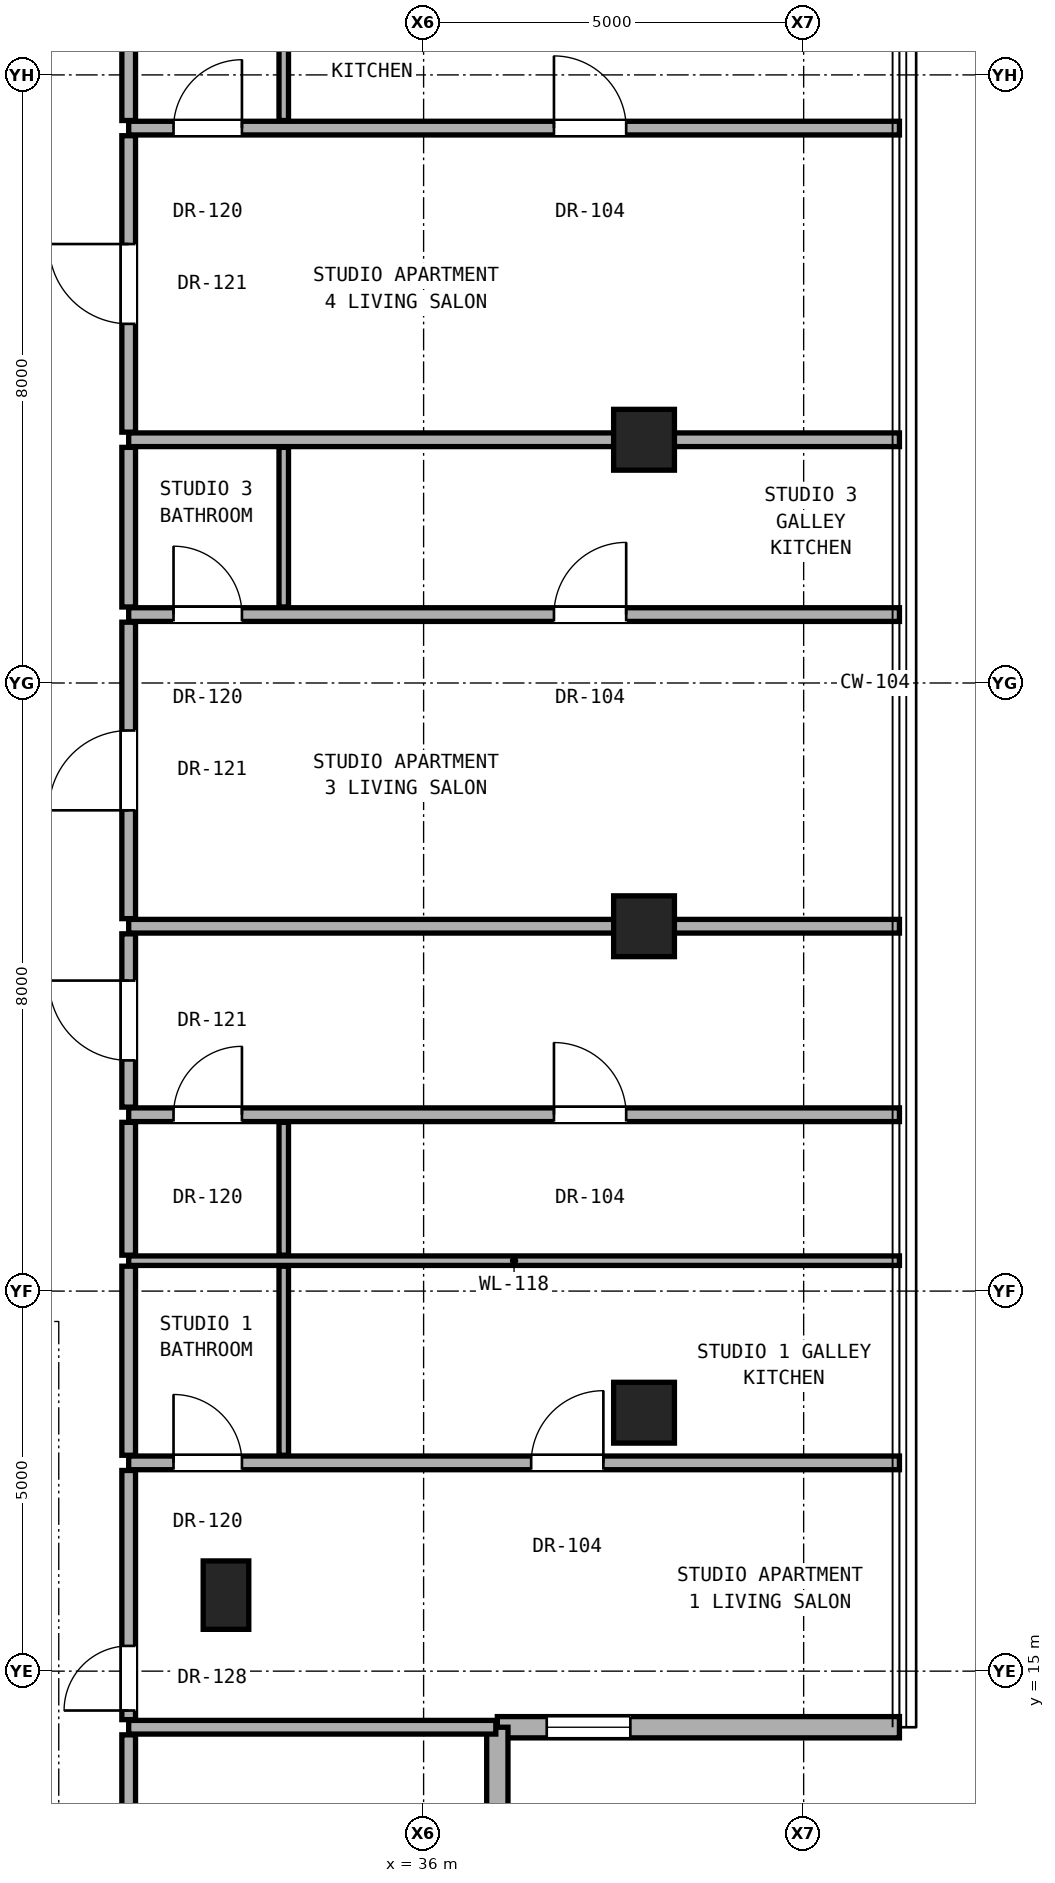
"""IFC4 building model, lengths in metres.
Left out: names, types, materials, properties, quantities, classifications, styles, units other than length and angle.
Written with IfcOpenShell. Run it as: python <this file> out.ifc"""

import sys

from ifc_helpers import new_model, si_unit, direction, frame, frame_2d, origin, origin_2d, place, context, subcontext, project, spatial, rectangle, hollow_rectangle, extrude, element, fill, save


model = new_model("IFC4")
c1 = context("Model", 3, precision=1e-05, world=origin(), true_north=direction((0.0, 1.0)))
c2 = subcontext(c1, "Body", "Model", "MODEL_VIEW")
j1 = project(units=[si_unit("LENGTHUNIT", "METRE"), si_unit("PLANEANGLEUNIT", "RADIAN")], contexts=[c1])
p1 = place(None, origin())
s1 = spatial("IfcSite", under=j1, at=p1, CompositionType="ELEMENT")
p2 = place(p1, origin())
s2 = spatial("IfcBuilding", under=s1, at=p2, CompositionType="ELEMENT")
p3 = place(p2, frame((0.0, 0.0, 239.2)))
s3 = spatial("IfcBuildingStorey", under=s2, at=p3, CompositionType="ELEMENT", Elevation=239.2)
for number, where, z_axis, x_axis in (
    (1, (38.9, 18.4, 0.0), (0.0, 0.0, 1.0), (1.0, 0.0, 0.0)),
    (2, (38.9, 24.8, 0.0), (0.0, 0.0, 1.0), (1.0, 0.0, 0.0)),
    (3, (38.9, 31.2, 0.0), (0.0, 0.0, 1.0), (1.0, 0.0, 0.0)),
):
    element("IfcColumn", number, at=place(p3, frame(where, z_axis=z_axis, x_axis=x_axis)), inside=s3, PredefinedType="COLUMN", context=c2, shape_type="SweptSolid", body=[
        extrude(hollow_rectangle(XDim=0.8, YDim=0.8, WallThickness=0.045, at=origin_2d()), origin(), (0.0, 0.0, 1.0), 3.3),
    ])
p4 = place(p3, frame((33.4, 16.0, 0.0), z_axis=(0.0, 0.0, 1.0), x_axis=(1.0, 0.0, 0.0)))
e4 = element("IfcColumn", 4, at=p4, inside=s3, PredefinedType="PILASTER", context=c2, shape_type="SweptSolid", body=[
    extrude(rectangle(XDim=0.6, YDim=0.9, at=origin_2d()), origin(), (0.0, 0.0, 1.0), 3.3),
])
p5 = place(p3, frame((36.97, 14.262, 0.0), z_axis=(0.0, 0.0, 1.0), x_axis=(1.0, 0.0, 0.0)))
e5 = element("IfcWall", 5, at=p5, inside=s3, PredefinedType="SOLIDWALL", context=c2, shape_type="SweptSolid", body=[
    extrude(rectangle(XDim=5.29, YDim=0.28, at=frame_2d((2.645, 0.0))), origin(), (0.0, 0.0, 1.0), 3.08),
])
p6 = place(p5, frame((0.65, 0.0, 0.85)))
e6 = element("IfcOpeningElement", 6, at=p6, cuts=e5, PredefinedType="OPENING", context=c2, shape_type="SweptSolid", body=[
    extrude(rectangle(XDim=1.1, YDim=2.0, at=frame_2d((0.55, 1.0))), frame((0.0, 0.15, 0.0), z_axis=(0.0, -1.0, 0.0), x_axis=(1.0, 0.0, 0.0)), (0.0, 0.0, 1.0), 0.3),
])
p7 = place(p3, frame((36.97, 8.972, 0.0), z_axis=(0.0, 0.0, 1.0), x_axis=(0.0, 1.0, 0.0)))
e7 = element("IfcWall", 7, at=p7, inside=s3, PredefinedType="SOLIDWALL", context=c2, shape_type="SweptSolid", body=[
    extrude(rectangle(XDim=5.29, YDim=0.28, at=frame_2d((2.645, 0.0))), origin(), (0.0, 0.0, 1.0), 3.08),
])
p8 = place(p3, frame((32.12, 14.262, 0.0), z_axis=(0.0, 0.0, 1.0), x_axis=(1.0, 0.0, 0.0)))
e8 = element("IfcWall", 8, at=p8, inside=s3, PredefinedType="PARTITIONING", context=c2, shape_type="SweptSolid", body=[
    extrude(rectangle(XDim=4.83, YDim=0.18, at=frame_2d((2.415, 0.0))), origin(), (0.0, 0.0, 1.0), 3.1),
])
p9 = place(p3, frame((32.12, 17.74, 0.0), z_axis=(0.0, 0.0, 1.0), x_axis=(1.0, 0.0, 0.0)))
e9 = element("IfcWall", 9, at=p9, inside=s3, PredefinedType="PARTITIONING", context=c2, shape_type="SweptSolid", body=[
    extrude(rectangle(XDim=10.14, YDim=0.18, at=frame_2d((5.07, 0.0))), origin(), (0.0, 0.0, 1.0), 2.543),
])
p10 = place(p9, frame((5.295, 0.0, 0.0)))
e10 = element("IfcOpeningElement", 10, at=p10, cuts=e9, PredefinedType="OPENING", context=c2, shape_type="SweptSolid", body=[
    extrude(rectangle(XDim=0.95, YDim=2.15, at=frame_2d((0.475, 1.075))), frame((0.0, 0.1, 0.0), z_axis=(0.0, -1.0, 0.0), x_axis=(1.0, 0.0, 0.0)), (0.0, 0.0, 1.0), 0.2),
])
p11 = place(p9, frame((0.59, 0.0, 0.0)))
e11 = element("IfcOpeningElement", 11, at=p11, cuts=e9, PredefinedType="OPENING", context=c2, shape_type="SweptSolid", body=[
    extrude(rectangle(XDim=0.9, YDim=2.1, at=frame_2d((0.45, 1.05))), frame((0.0, 0.1, 0.0), z_axis=(0.0, -1.0, 0.0), x_axis=(1.0, 0.0, 0.0)), (0.0, 0.0, 1.0), 0.2),
])
p12 = place(p3, frame((32.12, 20.4, 0.0), z_axis=(0.0, 0.0, 1.0), x_axis=(1.0, 0.0, 0.0)))
e12 = element("IfcWall", 12, at=p12, inside=s3, PredefinedType="PARTITIONING", context=c2, shape_type="SweptSolid", body=[
    extrude(rectangle(XDim=10.14, YDim=0.125, at=frame_2d((5.07, 0.0))), origin(), (0.0, 0.0, 1.0), 2.319),
])
p13 = place(p3, frame((32.12, 22.32, 0.0), z_axis=(0.0, 0.0, 1.0), x_axis=(1.0, 0.0, 0.0)))
e13 = element("IfcWall", 13, at=p13, inside=s3, PredefinedType="PARTITIONING", context=c2, shape_type="SweptSolid", body=[
    extrude(rectangle(XDim=10.14, YDim=0.18, at=frame_2d((5.07, 0.0))), origin(), (0.0, 0.0, 1.0), 2.319),
])
p14 = place(p13, frame((5.595, 0.0, 0.0)))
e14 = element("IfcOpeningElement", 14, at=p14, cuts=e13, PredefinedType="OPENING", context=c2, shape_type="SweptSolid", body=[
    extrude(rectangle(XDim=0.95, YDim=2.15, at=frame_2d((0.475, 1.075))), frame((0.0, 0.1, 0.0), z_axis=(0.0, -1.0, 0.0), x_axis=(1.0, 0.0, 0.0)), (0.0, 0.0, 1.0), 0.2),
])
p15 = place(p13, frame((0.59, 0.0, 0.0)))
e15 = element("IfcOpeningElement", 15, at=p15, cuts=e13, PredefinedType="OPENING", context=c2, shape_type="SweptSolid", body=[
    extrude(rectangle(XDim=0.9, YDim=2.1, at=frame_2d((0.45, 1.05))), frame((0.0, 0.1, 0.0), z_axis=(0.0, -1.0, 0.0), x_axis=(1.0, 0.0, 0.0)), (0.0, 0.0, 1.0), 0.2),
])
p16 = place(p3, frame((32.12, 24.8, 0.0), z_axis=(0.0, 0.0, 1.0), x_axis=(1.0, 0.0, 0.0)))
e16 = element("IfcWall", 16, at=p16, inside=s3, PredefinedType="PARTITIONING", context=c2, shape_type="SweptSolid", body=[
    extrude(rectangle(XDim=10.14, YDim=0.18, at=frame_2d((5.07, 0.0))), origin(), (0.0, 0.0, 1.0), 2.319),
])
p17 = place(p3, frame((32.12, 28.9, 0.0), z_axis=(0.0, 0.0, 1.0), x_axis=(1.0, 0.0, 0.0)))
e17 = element("IfcWall", 17, at=p17, inside=s3, PredefinedType="PARTITIONING", context=c2, shape_type="SweptSolid", body=[
    extrude(rectangle(XDim=10.14, YDim=0.18, at=frame_2d((5.07, 0.0))), origin(), (0.0, 0.0, 1.0), 2.319),
])
p18 = place(p17, frame((5.595, 0.0, 0.0)))
e18 = element("IfcOpeningElement", 18, at=p18, cuts=e17, PredefinedType="OPENING", context=c2, shape_type="SweptSolid", body=[
    extrude(rectangle(XDim=0.95, YDim=2.15, at=frame_2d((0.475, 1.075))), frame((0.0, 0.1, 0.0), z_axis=(0.0, -1.0, 0.0), x_axis=(1.0, 0.0, 0.0)), (0.0, 0.0, 1.0), 0.2),
])
p19 = place(p17, frame((0.59, 0.0, 0.0)))
e19 = element("IfcOpeningElement", 19, at=p19, cuts=e17, PredefinedType="OPENING", context=c2, shape_type="SweptSolid", body=[
    extrude(rectangle(XDim=0.9, YDim=2.1, at=frame_2d((0.45, 1.05))), frame((0.0, 0.1, 0.0), z_axis=(0.0, -1.0, 0.0), x_axis=(1.0, 0.0, 0.0)), (0.0, 0.0, 1.0), 0.2),
])
p20 = place(p3, frame((32.12, 31.2, 0.0), z_axis=(0.0, 0.0, 1.0), x_axis=(1.0, 0.0, 0.0)))
e20 = element("IfcWall", 20, at=p20, inside=s3, PredefinedType="PARTITIONING", context=c2, shape_type="SweptSolid", body=[
    extrude(rectangle(XDim=10.14, YDim=0.18, at=frame_2d((5.07, 0.0))), origin(), (0.0, 0.0, 1.0), 2.319),
])
p21 = place(p3, frame((32.12, 35.3, 0.0), z_axis=(0.0, 0.0, 1.0), x_axis=(1.0, 0.0, 0.0)))
e21 = element("IfcWall", 21, at=p21, inside=s3, PredefinedType="PARTITIONING", context=c2, shape_type="SweptSolid", body=[
    extrude(rectangle(XDim=10.14, YDim=0.18, at=frame_2d((5.07, 0.0))), origin(), (0.0, 0.0, 1.0), 2.319),
])
p22 = place(p21, frame((5.595, 0.0, 0.0)))
e22 = element("IfcOpeningElement", 22, at=p22, cuts=e21, PredefinedType="OPENING", context=c2, shape_type="SweptSolid", body=[
    extrude(rectangle(XDim=0.95, YDim=2.15, at=frame_2d((0.475, 1.075))), frame((0.0, 0.1, 0.0), z_axis=(0.0, -1.0, 0.0), x_axis=(1.0, 0.0, 0.0)), (0.0, 0.0, 1.0), 0.2),
])
p23 = place(p21, frame((0.59, 0.0, 0.0)))
e23 = element("IfcOpeningElement", 23, at=p23, cuts=e21, PredefinedType="OPENING", context=c2, shape_type="SweptSolid", body=[
    extrude(rectangle(XDim=0.9, YDim=2.1, at=frame_2d((0.45, 1.05))), frame((0.0, 0.1, 0.0), z_axis=(0.0, -1.0, 0.0), x_axis=(1.0, 0.0, 0.0)), (0.0, 0.0, 1.0), 0.2),
])
p24 = place(p3, frame((32.12, 8.972, 0.0), z_axis=(0.0, 0.0, 1.0), x_axis=(0.0, 1.0, 0.0)))
e24 = element("IfcWall", 24, at=p24, inside=s3, PredefinedType="PARTITIONING", context=c2, shape_type="SweptSolid", body=[
    extrude(rectangle(XDim=5.19, YDim=0.18, at=frame_2d((2.595, 0.0))), origin(), (0.0, 0.0, 1.0), 3.1),
])
p25 = place(p24, frame((2.12, 0.0, 0.0)))
e25 = element("IfcOpeningElement", 25, at=p25, cuts=e24, PredefinedType="OPENING", context=c2, shape_type="SweptSolid", body=[
    extrude(rectangle(XDim=0.95, YDim=2.15, at=frame_2d((0.475, 1.075))), frame((0.0, 0.1, 0.0), z_axis=(0.0, -1.0, 0.0), x_axis=(1.0, 0.0, 0.0)), (0.0, 0.0, 1.0), 0.2),
])
p26 = place(p3, frame((32.12, 14.362, 0.0), z_axis=(0.0, 0.0, 1.0), x_axis=(0.0, 1.0, 0.0)))
e26 = element("IfcWall", 26, at=p26, inside=s3, PredefinedType="PARTITIONING", context=c2, shape_type="SweptSolid", body=[
    extrude(rectangle(XDim=3.278, YDim=0.18, at=frame_2d((1.639, 0.0))), origin(), (0.0, 0.0, 1.0), 2.543),
])
p27 = place(p26, frame((0.12, 0.0, 0.0)))
e27 = element("IfcOpeningElement", 27, at=p27, cuts=e26, PredefinedType="OPENING", context=c2, shape_type="SweptSolid", body=[
    extrude(rectangle(XDim=0.85, YDim=2.01, at=frame_2d((0.425, 1.005))), frame((0.0, 0.1, 0.0), z_axis=(0.0, -1.0, 0.0), x_axis=(1.0, 0.0, 0.0)), (0.0, 0.0, 1.0), 0.2),
])
p28 = place(p3, frame((32.12, 17.84, 0.0), z_axis=(0.0, 0.0, 1.0), x_axis=(0.0, 1.0, 0.0)))
e28 = element("IfcWall", 28, at=p28, inside=s3, PredefinedType="PARTITIONING", context=c2, shape_type="SweptSolid", body=[
    extrude(rectangle(XDim=2.487, YDim=0.18, at=frame_2d((1.244, 0.0))), origin(), (0.0, 0.0, 1.0), 2.492),
])
p29 = place(p3, frame((32.12, 20.472, 0.0), z_axis=(0.0, 0.0, 1.0), x_axis=(0.0, 1.0, 0.0)))
e29 = element("IfcWall", 29, at=p29, inside=s3, PredefinedType="PARTITIONING", context=c2, shape_type="SweptSolid", body=[
    extrude(rectangle(XDim=1.748, YDim=0.18, at=frame_2d((0.874, 0.0))), origin(), (0.0, 0.0, 1.0), 3.1),
])
p30 = place(p3, frame((32.12, 22.42, 0.0), z_axis=(0.0, 0.0, 1.0), x_axis=(0.0, 1.0, 0.0)))
e30 = element("IfcWall", 30, at=p30, inside=s3, PredefinedType="PARTITIONING", context=c2, shape_type="SweptSolid", body=[
    extrude(rectangle(XDim=2.28, YDim=0.18, at=frame_2d((1.14, 0.0))), origin(), (0.0, 0.0, 1.0), 2.396),
])
p31 = place(p30, frame((0.615, 0.0, 0.0)))
e31 = element("IfcOpeningElement", 31, at=p31, cuts=e30, PredefinedType="OPENING", context=c2, shape_type="SweptSolid", body=[
    extrude(rectangle(XDim=1.05, YDim=2.2, at=frame_2d((0.525, 1.1))), frame((0.0, 0.1, 0.0), z_axis=(0.0, -1.0, 0.0), x_axis=(1.0, 0.0, 0.0)), (0.0, 0.0, 1.0), 0.2),
])
p32 = place(p3, frame((32.12, 24.9, 0.0), z_axis=(0.0, 0.0, 1.0), x_axis=(0.0, 1.0, 0.0)))
e32 = element("IfcWall", 32, at=p32, inside=s3, PredefinedType="PARTITIONING", context=c2, shape_type="SweptSolid", body=[
    extrude(rectangle(XDim=3.9, YDim=0.18, at=frame_2d((1.95, 0.0))), origin(), (0.0, 0.0, 1.0), 2.396),
])
p33 = place(p32, frame((1.425, 0.0, 0.0)))
e33 = element("IfcOpeningElement", 33, at=p33, cuts=e32, PredefinedType="OPENING", context=c2, shape_type="SweptSolid", body=[
    extrude(rectangle(XDim=1.05, YDim=2.2, at=frame_2d((0.525, 1.1))), frame((0.0, 0.1, 0.0), z_axis=(0.0, -1.0, 0.0), x_axis=(1.0, 0.0, 0.0)), (0.0, 0.0, 1.0), 0.2),
])
p34 = place(p3, frame((32.12, 29.0, 0.0), z_axis=(0.0, 0.0, 1.0), x_axis=(0.0, 1.0, 0.0)))
e34 = element("IfcWall", 34, at=p34, inside=s3, PredefinedType="PARTITIONING", context=c2, shape_type="SweptSolid", body=[
    extrude(rectangle(XDim=2.1, YDim=0.18, at=frame_2d((1.05, 0.0))), origin(), (0.0, 0.0, 1.0), 2.396),
])
p35 = place(p3, frame((32.12, 31.3, 0.0), z_axis=(0.0, 0.0, 1.0), x_axis=(0.0, 1.0, 0.0)))
e35 = element("IfcWall", 35, at=p35, inside=s3, PredefinedType="PARTITIONING", context=c2, shape_type="SweptSolid", body=[
    extrude(rectangle(XDim=3.9, YDim=0.18, at=frame_2d((1.95, 0.0))), origin(), (0.0, 0.0, 1.0), 2.396),
])
p36 = place(p35, frame((1.425, 0.0, 0.0)))
e36 = element("IfcOpeningElement", 36, at=p36, cuts=e35, PredefinedType="OPENING", context=c2, shape_type="SweptSolid", body=[
    extrude(rectangle(XDim=1.05, YDim=2.2, at=frame_2d((0.525, 1.1))), frame((0.0, 0.1, 0.0), z_axis=(0.0, -1.0, 0.0), x_axis=(1.0, 0.0, 0.0)), (0.0, 0.0, 1.0), 0.2),
])
p37 = place(p3, frame((32.12, 35.4, 0.0), z_axis=(0.0, 0.0, 1.0), x_axis=(0.0, 1.0, 0.0)))
e37 = element("IfcWall", 37, at=p37, inside=s3, PredefinedType="PARTITIONING", context=c2, shape_type="SweptSolid", body=[
    extrude(rectangle(XDim=2.1, YDim=0.18, at=frame_2d((1.05, 0.0))), origin(), (0.0, 0.0, 1.0), 2.492),
])
p38 = place(p3, frame((34.16, 17.84, 0.0), z_axis=(0.0, 0.0, 1.0), x_axis=(0.0, 1.0, 0.0)))
e38 = element("IfcWall", 38, at=p38, inside=s3, PredefinedType="PARTITIONING", context=c2, shape_type="SweptSolid", body=[
    extrude(rectangle(XDim=2.487, YDim=0.125, at=frame_2d((1.244, 0.0))), origin(), (0.0, 0.0, 1.0), 2.492),
])
p39 = place(p3, frame((34.16, 20.472, 0.0), z_axis=(0.0, 0.0, 1.0), x_axis=(0.0, 1.0, 0.0)))
e39 = element("IfcWall", 39, at=p39, inside=s3, PredefinedType="PARTITIONING", context=c2, shape_type="SweptSolid", body=[
    extrude(rectangle(XDim=1.748, YDim=0.125, at=frame_2d((0.874, 0.0))), origin(), (0.0, 0.0, 1.0), 3.1),
])
p40 = place(p3, frame((34.16, 29.0, 0.0), z_axis=(0.0, 0.0, 1.0), x_axis=(0.0, 1.0, 0.0)))
e40 = element("IfcWall", 40, at=p40, inside=s3, PredefinedType="PARTITIONING", context=c2, shape_type="SweptSolid", body=[
    extrude(rectangle(XDim=2.1, YDim=0.125, at=frame_2d((1.05, 0.0))), origin(), (0.0, 0.0, 1.0), 2.396),
])
p41 = place(p3, frame((34.16, 35.4, 0.0), z_axis=(0.0, 0.0, 1.0), x_axis=(0.0, 1.0, 0.0)))
e41 = element("IfcWall", 41, at=p41, inside=s3, PredefinedType="PARTITIONING", context=c2, shape_type="SweptSolid", body=[
    extrude(rectangle(XDim=2.1, YDim=0.125, at=frame_2d((1.05, 0.0))), origin(), (0.0, 0.0, 1.0), 2.492),
])
p42 = place(p6, origin())
e42 = element("IfcWindow", 42, at=p42, inside=s3, PartitioningType="SINGLE_PANEL", PredefinedType="WINDOW", context=c2, shape_type="SweptSolid", body=[
    extrude(rectangle(XDim=1.1, YDim=2.0, at=frame_2d((0.55, 1.0))), frame((0.0, 0.03, 0.0), z_axis=(0.0, -1.0, 0.0), x_axis=(1.0, 0.0, 0.0)), (0.0, 0.0, 1.0), 0.06),
])
fill(e6, e42)
p43 = place(p27, origin())
e43 = element("IfcDoor", 43, at=p43, inside=s3, OperationType="SINGLE_SWING_LEFT", PredefinedType="DOOR", context=c2, shape_type="SweptSolid", body=[
    extrude(rectangle(XDim=0.85, YDim=2.01, at=frame_2d((0.425, 1.005))), frame((0.0, 0.025, 0.0), z_axis=(0.0, -1.0, 0.0), x_axis=(1.0, 0.0, 0.0)), (0.0, 0.0, 1.0), 0.05),
])
fill(e27, e43)
p44 = place(p10, origin())
e44 = element("IfcDoor", 44, at=p44, inside=s3, OperationType="SINGLE_SWING_RIGHT", PredefinedType="DOOR", context=c2, shape_type="SweptSolid", body=[
    extrude(rectangle(XDim=0.95, YDim=2.15, at=frame_2d((0.475, 1.075))), frame((0.0, 0.025, 0.0), z_axis=(0.0, -1.0, 0.0), x_axis=(1.0, 0.0, 0.0)), (0.0, 0.0, 1.0), 0.05),
])
fill(e10, e44)
p45 = place(p11, origin())
e45 = element("IfcDoor", 45, at=p45, inside=s3, OperationType="SINGLE_SWING_LEFT", PredefinedType="DOOR", context=c2, shape_type="SweptSolid", body=[
    extrude(rectangle(XDim=0.9, YDim=2.1, at=frame_2d((0.45, 1.05))), frame((0.0, 0.025, 0.0), z_axis=(0.0, -1.0, 0.0), x_axis=(1.0, 0.0, 0.0)), (0.0, 0.0, 1.0), 0.05),
])
fill(e11, e45)
p46 = place(p31, origin())
e46 = element("IfcDoor", 46, at=p46, inside=s3, OperationType="SINGLE_SWING_RIGHT", PredefinedType="DOOR", context=c2, shape_type="SweptSolid", body=[
    extrude(rectangle(XDim=1.05, YDim=2.2, at=frame_2d((0.525, 1.1))), frame((0.0, 0.025, 0.0), z_axis=(0.0, -1.0, 0.0), x_axis=(1.0, 0.0, 0.0)), (0.0, 0.0, 1.0), 0.05),
])
fill(e31, e46)
p47 = place(p14, origin())
e47 = element("IfcDoor", 47, at=p47, inside=s3, OperationType="SINGLE_SWING_LEFT", PredefinedType="DOOR", context=c2, shape_type="SweptSolid", body=[
    extrude(rectangle(XDim=0.95, YDim=2.15, at=frame_2d((0.475, 1.075))), frame((0.0, 0.025, 0.0), z_axis=(0.0, -1.0, 0.0), x_axis=(1.0, 0.0, 0.0)), (0.0, 0.0, 1.0), 0.05),
])
fill(e14, e47)
p48 = place(p15, origin())
e48 = element("IfcDoor", 48, at=p48, inside=s3, OperationType="SINGLE_SWING_RIGHT", PredefinedType="DOOR", context=c2, shape_type="SweptSolid", body=[
    extrude(rectangle(XDim=0.9, YDim=2.1, at=frame_2d((0.45, 1.05))), frame((0.0, 0.025, 0.0), z_axis=(0.0, -1.0, 0.0), x_axis=(1.0, 0.0, 0.0)), (0.0, 0.0, 1.0), 0.05),
])
fill(e15, e48)
p49 = place(p33, origin())
e49 = element("IfcDoor", 49, at=p49, inside=s3, OperationType="SINGLE_SWING_LEFT", PredefinedType="DOOR", context=c2, shape_type="SweptSolid", body=[
    extrude(rectangle(XDim=1.05, YDim=2.2, at=frame_2d((0.525, 1.1))), frame((0.0, 0.025, 0.0), z_axis=(0.0, -1.0, 0.0), x_axis=(1.0, 0.0, 0.0)), (0.0, 0.0, 1.0), 0.05),
])
fill(e33, e49)
p50 = place(p18, origin())
e50 = element("IfcDoor", 50, at=p50, inside=s3, OperationType="SINGLE_SWING_RIGHT", PredefinedType="DOOR", context=c2, shape_type="SweptSolid", body=[
    extrude(rectangle(XDim=0.95, YDim=2.15, at=frame_2d((0.475, 1.075))), frame((0.0, 0.025, 0.0), z_axis=(0.0, -1.0, 0.0), x_axis=(1.0, 0.0, 0.0)), (0.0, 0.0, 1.0), 0.05),
])
fill(e18, e50)
p51 = place(p19, origin())
e51 = element("IfcDoor", 51, at=p51, inside=s3, OperationType="SINGLE_SWING_LEFT", PredefinedType="DOOR", context=c2, shape_type="SweptSolid", body=[
    extrude(rectangle(XDim=0.9, YDim=2.1, at=frame_2d((0.45, 1.05))), frame((0.0, 0.025, 0.0), z_axis=(0.0, -1.0, 0.0), x_axis=(1.0, 0.0, 0.0)), (0.0, 0.0, 1.0), 0.05),
])
fill(e19, e51)
p52 = place(p36, origin())
e52 = element("IfcDoor", 52, at=p52, inside=s3, OperationType="SINGLE_SWING_RIGHT", PredefinedType="DOOR", context=c2, shape_type="SweptSolid", body=[
    extrude(rectangle(XDim=1.05, YDim=2.2, at=frame_2d((0.525, 1.1))), frame((0.0, 0.025, 0.0), z_axis=(0.0, -1.0, 0.0), x_axis=(1.0, 0.0, 0.0)), (0.0, 0.0, 1.0), 0.05),
])
fill(e36, e52)
p53 = place(p22, origin())
e53 = element("IfcDoor", 53, at=p53, inside=s3, OperationType="SINGLE_SWING_LEFT", PredefinedType="DOOR", context=c2, shape_type="SweptSolid", body=[
    extrude(rectangle(XDim=0.95, YDim=2.15, at=frame_2d((0.475, 1.075))), frame((0.0, 0.025, 0.0), z_axis=(0.0, -1.0, 0.0), x_axis=(1.0, 0.0, 0.0)), (0.0, 0.0, 1.0), 0.05),
])
fill(e22, e53)
p54 = place(p23, origin())
e54 = element("IfcDoor", 54, at=p54, inside=s3, OperationType="SINGLE_SWING_RIGHT", PredefinedType="DOOR", context=c2, shape_type="SweptSolid", body=[
    extrude(rectangle(XDim=0.9, YDim=2.1, at=frame_2d((0.45, 1.05))), frame((0.0, 0.025, 0.0), z_axis=(0.0, -1.0, 0.0), x_axis=(1.0, 0.0, 0.0)), (0.0, 0.0, 1.0), 0.05),
])
fill(e23, e54)
save(model, sys.argv[1])
